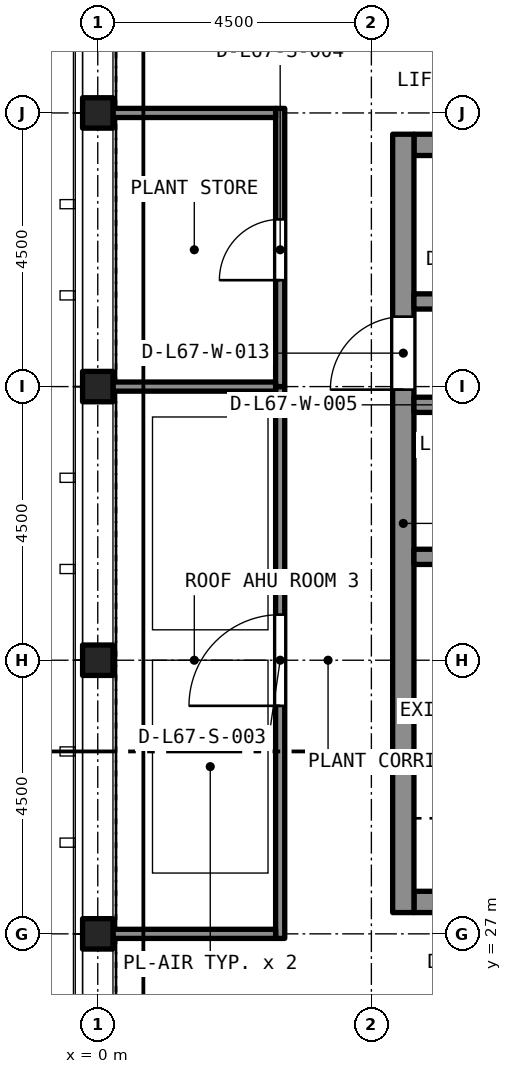
"""IFC4 building model, lengths in metres.
Left out: names, types, materials, properties, quantities, classifications, styles, units other than length and angle.
Written with IfcOpenShell. Run it as: python <this file> out.ifc"""

import sys

from ifc_helpers import new_model, si_unit, direction, frame, frame_2d, origin, origin_2d, place, context, subcontext, project, spatial, rectangle, hollow_rectangle, extrude, element, fill, save


model = new_model("IFC4")
c1 = context("Model", 3, precision=1e-05, world=origin(), true_north=direction((0.0, 1.0)))
c2 = subcontext(c1, "Body", "Model", "MODEL_VIEW")
j1 = project(units=[si_unit("LENGTHUNIT", "METRE"), si_unit("PLANEANGLEUNIT", "RADIAN")], contexts=[c1])
p1 = place(None, origin())
s1 = spatial("IfcSite", under=j1, at=p1, CompositionType="ELEMENT")
p2 = place(p1, origin())
s2 = spatial("IfcBuilding", under=s1, at=p2, CompositionType="ELEMENT")
p3 = place(p2, frame((0.0, 0.0, 247.095)))
s3 = spatial("IfcBuildingStorey", under=s2, at=p3, CompositionType="ELEMENT", Elevation=247.095)
p4 = place(p3, frame((5.2, 27.525, 0.0), z_axis=(0.0, 0.0, 1.0), x_axis=(1.0, 0.0, 0.0)))
e1 = element("IfcWall", 1, at=p4, inside=s3, PredefinedType="SOLIDWALL", context=c2, shape_type="SweptSolid", body=[
    extrude(rectangle(XDim=7.6, YDim=0.35, at=frame_2d((3.8, 0.0))), origin(), (0.0, 0.0, 1.0), 11.4),
])
p5 = place(p4, frame((0.725, 0.0, 0.0)))
e2 = element("IfcOpeningElement", 2, at=p5, cuts=e1, PredefinedType="OPENING", context=c2, shape_type="SweptSolid", body=[
    extrude(rectangle(XDim=1.1, YDim=2.1, at=frame_2d((0.55, 1.05))), frame((0.0, 0.185, 0.0), z_axis=(0.0, -1.0, 0.0), x_axis=(1.0, 0.0, 0.0)), (0.0, 0.0, 1.0), 0.37),
])
p6 = place(p4, frame((3.25, 0.0, 0.0)))
e3 = element("IfcOpeningElement", 3, at=p6, cuts=e1, PredefinedType="OPENING", context=c2, shape_type="SweptSolid", body=[
    extrude(rectangle(XDim=1.1, YDim=2.1, at=frame_2d((0.55, 1.05))), frame((0.0, 0.185, 0.0), z_axis=(0.0, -1.0, 0.0), x_axis=(1.0, 0.0, 0.0)), (0.0, 0.0, 1.0), 0.37),
])
p7 = place(p4, frame((5.775, 0.0, 0.0)))
e4 = element("IfcOpeningElement", 4, at=p7, cuts=e1, PredefinedType="OPENING", context=c2, shape_type="SweptSolid", body=[
    extrude(rectangle(XDim=1.1, YDim=2.1, at=frame_2d((0.55, 1.05))), frame((0.0, 0.185, 0.0), z_axis=(0.0, -1.0, 0.0), x_axis=(1.0, 0.0, 0.0)), (0.0, 0.0, 1.0), 0.37),
])
p8 = place(p3, frame((5.2, 39.975, 0.0), z_axis=(0.0, 0.0, 1.0), x_axis=(1.0, 0.0, 0.0)))
e5 = element("IfcWall", 5, at=p8, inside=s3, PredefinedType="SOLIDWALL", context=c2, shape_type="SweptSolid", body=[
    extrude(rectangle(XDim=7.6, YDim=0.35, at=frame_2d((3.8, 0.0))), origin(), (0.0, 0.0, 1.0), 11.4),
])
p9 = place(p3, frame((5.025, 27.35, 0.0), z_axis=(0.0, 0.0, 1.0), x_axis=(0.0, 1.0, 0.0)))
e6 = element("IfcWall", 6, at=p9, inside=s3, PredefinedType="SOLIDWALL", context=c2, shape_type="SweptSolid", body=[
    extrude(rectangle(XDim=12.8, YDim=0.35, at=frame_2d((6.4, 0.0))), origin(), (0.0, 0.0, 1.0), 11.4),
])
p10 = place(p9, frame((8.6, 0.0, 0.0)))
e7 = element("IfcOpeningElement", 7, at=p10, cuts=e6, PredefinedType="OPENING", context=c2, shape_type="SweptSolid", body=[
    extrude(rectangle(XDim=1.2, YDim=2.1, at=frame_2d((0.6, 1.05))), frame((0.0, 0.185, 0.0), z_axis=(0.0, -1.0, 0.0), x_axis=(1.0, 0.0, 0.0)), (0.0, 0.0, 1.0), 0.37),
])
for number, where, z_axis, x_axis in (
    (8, (0.0, 27.0, 0.0), (0.0, 0.0, 1.0), (1.0, 0.0, 0.0)),
    (9, (0.0, 31.5, 0.0), (0.0, 0.0, 1.0), (1.0, 0.0, 0.0)),
    (10, (0.0, 36.0, 0.0), (0.0, 0.0, 1.0), (1.0, 0.0, 0.0)),
    (11, (0.0, 40.5, 0.0), (0.0, 0.0, 1.0), (1.0, 0.0, 0.0)),
):
    element("IfcColumn", number, at=place(p3, frame(where, z_axis=z_axis, x_axis=x_axis)), inside=s3, PredefinedType="COLUMN", context=c2, shape_type="SweptSolid", body=[
        extrude(hollow_rectangle(XDim=0.5, YDim=0.5, WallThickness=0.025, at=origin_2d()), origin(), (0.0, 0.0, 1.0), 11.37),
    ])
p11 = place(p3, frame((5.2, 33.2, 0.0), z_axis=(0.0, 0.0, 1.0), x_axis=(1.0, 0.0, 0.0)))
e12 = element("IfcWall", 12, at=p11, inside=s3, PredefinedType="SOLIDWALL", context=c2, shape_type="SweptSolid", body=[
    extrude(rectangle(XDim=7.6, YDim=0.25, at=frame_2d((3.8, 0.0))), origin(), (0.0, 0.0, 1.0), 9.8),
])
p12 = place(p11, frame((3.3, 0.0, 0.0)))
e13 = element("IfcOpeningElement", 13, at=p12, cuts=e12, PredefinedType="OPENING", context=c2, shape_type="SweptSolid", body=[
    extrude(rectangle(XDim=1.0, YDim=2.1, at=frame_2d((0.5, 1.05))), frame((0.0, 0.135, 0.0), z_axis=(0.0, -1.0, 0.0), x_axis=(1.0, 0.0, 0.0)), (0.0, 0.0, 1.0), 0.27),
])
p13 = place(p3, frame((5.2, 35.7, 0.0), z_axis=(0.0, 0.0, 1.0), x_axis=(1.0, 0.0, 0.0)))
e14 = element("IfcWall", 14, at=p13, inside=s3, PredefinedType="SOLIDWALL", context=c2, shape_type="SweptSolid", body=[
    extrude(rectangle(XDim=7.6, YDim=0.25, at=frame_2d((3.8, 0.0))), origin(), (0.0, 0.0, 1.0), 9.8),
])
p14 = place(p13, frame((0.725, 0.0, 0.0)))
e15 = element("IfcOpeningElement", 15, at=p14, cuts=e14, PredefinedType="OPENING", context=c2, shape_type="SweptSolid", body=[
    extrude(rectangle(XDim=1.1, YDim=2.4, at=frame_2d((0.55, 1.2))), frame((0.0, 0.135, 0.0), z_axis=(0.0, -1.0, 0.0), x_axis=(1.0, 0.0, 0.0)), (0.0, 0.0, 1.0), 0.27),
])
p15 = place(p13, frame((5.125, 0.0, 0.0)))
e16 = element("IfcOpeningElement", 16, at=p15, cuts=e14, PredefinedType="OPENING", context=c2, shape_type="SweptSolid", body=[
    extrude(rectangle(XDim=0.8, YDim=2.1, at=frame_2d((0.4, 1.05))), frame((0.0, 0.135, 0.0), z_axis=(0.0, -1.0, 0.0), x_axis=(1.0, 0.0, 0.0)), (0.0, 0.0, 1.0), 0.27),
])
p16 = place(p13, frame((6.45, 0.0, 0.0)))
e17 = element("IfcOpeningElement", 17, at=p16, cuts=e14, PredefinedType="OPENING", context=c2, shape_type="SweptSolid", body=[
    extrude(rectangle(XDim=0.9, YDim=2.1, at=frame_2d((0.45, 1.05))), frame((0.0, 0.135, 0.0), z_axis=(0.0, -1.0, 0.0), x_axis=(1.0, 0.0, 0.0)), (0.0, 0.0, 1.0), 0.27),
])
p17 = place(p3, frame((5.2, 37.4, 0.0), z_axis=(0.0, 0.0, 1.0), x_axis=(1.0, 0.0, 0.0)))
e18 = element("IfcWall", 18, at=p17, inside=s3, PredefinedType="SOLIDWALL", context=c2, shape_type="SweptSolid", body=[
    extrude(rectangle(XDim=7.6, YDim=0.25, at=frame_2d((3.8, 0.0))), origin(), (0.0, 0.0, 1.0), 9.8),
])
p18 = place(p17, frame((0.7, 0.0, 0.0)))
e19 = element("IfcOpeningElement", 19, at=p18, cuts=e18, PredefinedType="OPENING", context=c2, shape_type="SweptSolid", body=[
    extrude(rectangle(XDim=1.1, YDim=2.4, at=frame_2d((0.55, 1.2))), frame((0.0, 0.135, 0.0), z_axis=(0.0, -1.0, 0.0), x_axis=(1.0, 0.0, 0.0)), (0.0, 0.0, 1.0), 0.27),
])
p19 = place(p3, frame((3.0, 26.925, 0.0), z_axis=(0.0, 0.0, 1.0), x_axis=(0.0, 1.0, 0.0)))
e20 = element("IfcWall", 20, at=p19, inside=s3, PredefinedType="PARTITIONING", context=c2, shape_type="SweptSolid", body=[
    extrude(rectangle(XDim=9.075, YDim=0.15, at=frame_2d((4.538, 0.0))), origin(), (0.0, 0.0, 1.0), 9.8),
])
p20 = place(p19, frame((3.825, 0.0, 0.0)))
e21 = element("IfcOpeningElement", 21, at=p20, cuts=e20, PredefinedType="OPENING", context=c2, shape_type="SweptSolid", body=[
    extrude(rectangle(XDim=1.5, YDim=2.4, at=frame_2d((0.75, 1.2))), frame((0.0, 0.085, 0.0), z_axis=(0.0, -1.0, 0.0), x_axis=(1.0, 0.0, 0.0)), (0.0, 0.0, 1.0), 0.17),
])
p21 = place(p3, frame((3.0, 36.0, 0.0), z_axis=(0.0, 0.0, 1.0), x_axis=(0.0, 1.0, 0.0)))
e22 = element("IfcWall", 22, at=p21, inside=s3, PredefinedType="PARTITIONING", context=c2, shape_type="SweptSolid", body=[
    extrude(rectangle(XDim=4.575, YDim=0.15, at=frame_2d((2.288, 0.0))), origin(), (0.0, 0.0, 1.0), 9.8),
])
p22 = place(p21, frame((1.75, 0.0, 0.0)))
e23 = element("IfcOpeningElement", 23, at=p22, cuts=e22, PredefinedType="OPENING", context=c2, shape_type="SweptSolid", body=[
    extrude(rectangle(XDim=1.0, YDim=2.1, at=frame_2d((0.5, 1.05))), frame((0.0, 0.085, 0.0), z_axis=(0.0, -1.0, 0.0), x_axis=(1.0, 0.0, 0.0)), (0.0, 0.0, 1.0), 0.17),
])
for number, where, z_axis, x_axis in (
    (24, (0.25, 27.0, 0.0), (0.0, 0.0, 1.0), (1.0, 0.0, 0.0)),
    (25, (0.25, 40.5, 0.0), (0.0, 0.0, 1.0), (1.0, 0.0, 0.0)),
    (26, (0.25, 36.0, 0.0), (0.0, 0.0, 1.0), (1.0, 0.0, 0.0)),
):
    element("IfcWall", number, at=place(p3, frame(where, z_axis=z_axis, x_axis=x_axis)), inside=s3, PredefinedType="PARTITIONING", context=c2, shape_type="SweptSolid", body=[
        extrude(rectangle(XDim=2.675, YDim=0.15, at=frame_2d((1.337, 0.0))), origin(), (0.0, 0.0, 1.0), 9.8),
    ])
p23 = place(p10, origin())
e27 = element("IfcDoor", 27, at=p23, inside=s3, OperationType="SINGLE_SWING_LEFT", PredefinedType="DOOR", context=c2, shape_type="SweptSolid", body=[
    extrude(rectangle(XDim=1.2, YDim=2.1, at=frame_2d((0.6, 1.05))), frame((0.0, 0.025, 0.0), z_axis=(0.0, -1.0, 0.0), x_axis=(1.0, 0.0, 0.0)), (0.0, 0.0, 1.0), 0.05),
])
fill(e7, e27)
p24 = place(p20, origin())
e28 = element("IfcDoor", 28, at=p24, inside=s3, OperationType="DOUBLE_DOOR_SINGLE_SWING", PredefinedType="DOOR", context=c2, shape_type="SweptSolid", body=[
    extrude(rectangle(XDim=1.5, YDim=2.4, at=frame_2d((0.75, 1.2))), frame((0.0, 0.025, 0.0), z_axis=(0.0, -1.0, 0.0), x_axis=(1.0, 0.0, 0.0)), (0.0, 0.0, 1.0), 0.05),
])
fill(e21, e28)
p25 = place(p22, origin())
e29 = element("IfcDoor", 29, at=p25, inside=s3, OperationType="SINGLE_SWING_LEFT", PredefinedType="DOOR", context=c2, shape_type="SweptSolid", body=[
    extrude(rectangle(XDim=1.0, YDim=2.1, at=frame_2d((0.5, 1.05))), frame((0.0, 0.025, 0.0), z_axis=(0.0, -1.0, 0.0), x_axis=(1.0, 0.0, 0.0)), (0.0, 0.0, 1.0), 0.05),
])
fill(e23, e29)
save(model, sys.argv[1])
